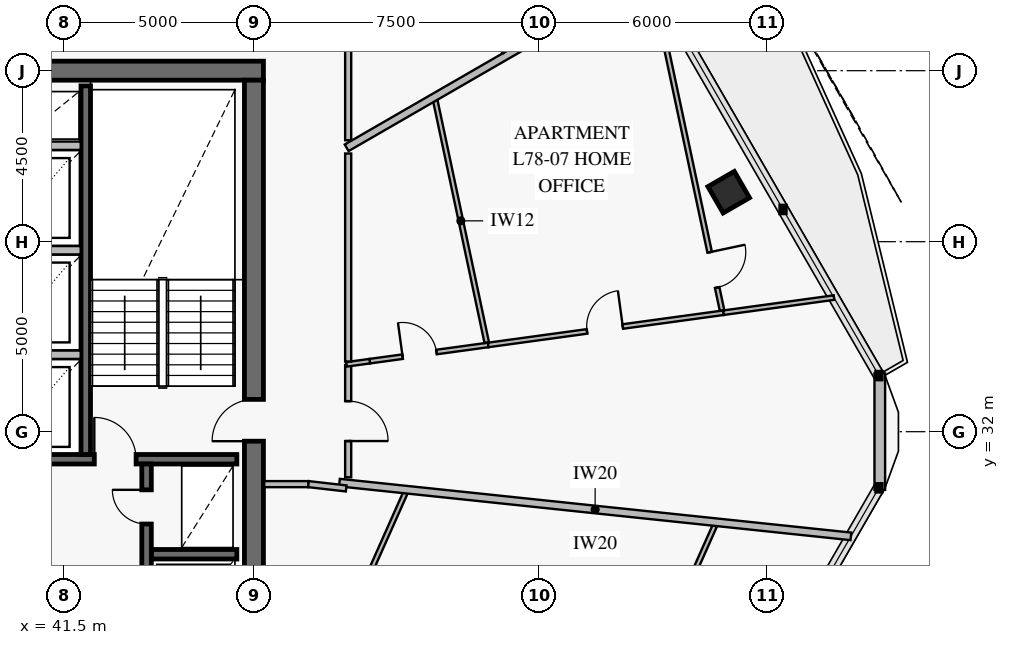
"""IFC4 building model, lengths in metres.
Left out: names, types, materials, properties, quantities, classifications, styles, units other than length and angle.
Written with IfcOpenShell. Run it as: python <this file> out.ifc"""

import sys

from ifc_helpers import new_model, si_unit, direction, frame, frame_2d, origin, origin_2d, place, context, subcontext, project, spatial, rectangle, extrude, element, fill, save


model = new_model("IFC4")
c1 = context("Model", 3, precision=1e-05, world=origin(), true_north=direction((0.0, 1.0)))
c2 = subcontext(c1, "Body", "Model", "MODEL_VIEW")
j1 = project(units=[si_unit("LENGTHUNIT", "METRE"), si_unit("PLANEANGLEUNIT", "RADIAN")], contexts=[c1])
p1 = place(None, origin())
s1 = spatial("IfcSite", under=j1, at=p1, CompositionType="ELEMENT")
p2 = place(p1, origin())
s2 = spatial("IfcBuilding", under=s1, at=p2, CompositionType="ELEMENT")
p3 = place(p2, frame((0.0, 0.0, 308.2)))
s3 = spatial("IfcBuildingStorey", under=s2, at=p3, CompositionType="ELEMENT", Elevation=308.2)
p4 = place(p3, frame((46.75, 41.5, 0.0), z_axis=(0.0, 0.0, 1.0), x_axis=(-1.0, 0.0, 0.0)))
e1 = element("IfcWall", 1, at=p4, inside=s3, PredefinedType="SHEAR", context=c2, shape_type="SweptSolid", body=[
    extrude(rectangle(XDim=7.8, YDim=0.5, at=frame_2d((3.9, 0.0))), origin(), (0.0, 0.0, 1.0), 3.8),
])
p5 = place(p3, frame((46.5, 22.75, 0.0), z_axis=(0.0, 0.0, 1.0), x_axis=(0.0, 1.0, 0.0)))
e2 = element("IfcWall", 2, at=p5, inside=s3, PredefinedType="SHEAR", context=c2, shape_type="SweptSolid", body=[
    extrude(rectangle(XDim=18.5, YDim=0.5, at=frame_2d((9.25, 0.0))), origin(), (0.0, 0.0, 1.0), 3.8),
])
p6 = place(p5, frame((9.0, 0.0, 0.0)))
e3 = element("IfcOpeningElement", 3, at=p6, cuts=e2, PredefinedType="OPENING", context=c2, shape_type="SweptSolid", body=[
    extrude(rectangle(XDim=1.1, YDim=2.15, at=frame_2d((0.55, 1.075))), frame((0.0, 0.262, 0.0), z_axis=(0.0, -1.0, 0.0), x_axis=(1.0, 0.0, 0.0)), (0.0, 0.0, 1.0), 0.524),
])
p7 = place(p3, frame((58.993, 38.302, 0.0), z_axis=(0.0, 0.0, 1.0), x_axis=(-0.5, 0.866025403784, 0.0)))
e4 = element("IfcColumn", 4, at=p7, inside=s3, PredefinedType="COLUMN", context=c2, shape_type="SweptSolid", body=[
    extrude(rectangle(XDim=0.8, YDim=0.8, at=origin_2d()), origin(), (0.0, 0.0, 1.0), 3.55),
])
p8 = place(p3, frame((62.969, 33.532, 0.0), z_axis=(0.0, 0.0, 1.0), x_axis=(0.0, -1.0, 0.0)))
e5 = element("IfcWall", 5, at=p8, inside=s3, PredefinedType="SOLIDWALL", context=c2, shape_type="SweptSolid", body=[
    extrude(rectangle(XDim=3.065, YDim=0.28, at=frame_2d((1.532, 0.0))), origin(), (0.0, 0.0, 1.0), 3.55),
])
p9 = place(p3, frame((25.95, 31.275, 0.0), z_axis=(0.0, 0.0, 1.0), x_axis=(1.0, 0.0, 0.0)))
e6 = element("IfcWall", 6, at=p9, inside=s3, PredefinedType="SOLIDWALL", context=c2, shape_type="SweptSolid", body=[
    extrude(rectangle(XDim=20.1, YDim=0.25, at=frame_2d((10.05, 0.0))), origin(), (0.0, 0.0, 1.0), 3.8),
])
p10 = place(p9, frame((2.6, 0.0, 0.0)))
e7 = element("IfcOpeningElement", 7, at=p10, cuts=e6, PredefinedType="OPENING", context=c2, shape_type="SweptSolid", body=[
    extrude(rectangle(XDim=1.1, YDim=2.15, at=frame_2d((0.55, 1.075))), frame((0.0, 0.137, 0.0), z_axis=(0.0, -1.0, 0.0), x_axis=(1.0, 0.0, 0.0)), (0.0, 0.0, 1.0), 0.274),
])
p11 = place(p9, frame((10.6, 0.0, 0.0)))
e8 = element("IfcOpeningElement", 8, at=p11, cuts=e6, PredefinedType="OPENING", context=c2, shape_type="SweptSolid", body=[
    extrude(rectangle(XDim=1.1, YDim=2.15, at=frame_2d((0.55, 1.075))), frame((0.0, 0.137, 0.0), z_axis=(0.0, -1.0, 0.0), x_axis=(1.0, 0.0, 0.0)), (0.0, 0.0, 1.0), 0.274),
])
p12 = place(p9, frame((16.35, 0.0, 0.0)))
e9 = element("IfcOpeningElement", 9, at=p12, cuts=e6, PredefinedType="OPENING", context=c2, shape_type="SweptSolid", body=[
    extrude(rectangle(XDim=1.1, YDim=2.15, at=frame_2d((0.55, 1.075))), frame((0.0, 0.137, 0.0), z_axis=(0.0, -1.0, 0.0), x_axis=(1.0, 0.0, 0.0)), (0.0, 0.0, 1.0), 0.274),
])
p13 = place(p3, frame((42.075, 31.4, 0.0), z_axis=(0.0, 0.0, 1.0), x_axis=(0.0, 1.0, 0.0)))
e10 = element("IfcWall", 10, at=p13, inside=s3, PredefinedType="SOLIDWALL", context=c2, shape_type="SweptSolid", body=[
    extrude(rectangle(XDim=9.7, YDim=0.25, at=frame_2d((4.85, 0.0))), origin(), (0.0, 0.0, 1.0), 3.8),
])
p14 = place(p3, frame((43.8, 28.775, 0.0), z_axis=(0.0, 0.0, 1.0), x_axis=(1.0, 0.0, 0.0)))
e11 = element("IfcWall", 11, at=p14, inside=s3, PredefinedType="SOLIDWALL", context=c2, shape_type="SweptSolid", body=[
    extrude(rectangle(XDim=2.25, YDim=0.25, at=frame_2d((1.125, 0.0))), origin(), (0.0, 0.0, 1.0), 3.8),
])
p15 = place(p3, frame((43.675, 22.95, 0.0), z_axis=(0.0, 0.0, 1.0), x_axis=(0.0, 1.0, 0.0)))
e12 = element("IfcWall", 12, at=p15, inside=s3, PredefinedType="SOLIDWALL", context=c2, shape_type="SweptSolid", body=[
    extrude(rectangle(XDim=8.2, YDim=0.25, at=frame_2d((4.1, 0.0))), origin(), (0.0, 0.0, 1.0), 3.8),
])
p16 = place(p15, frame((0.75, 0.0, 0.0)))
e13 = element("IfcOpeningElement", 13, at=p16, cuts=e12, PredefinedType="OPENING", context=c2, shape_type="SweptSolid", body=[
    extrude(rectangle(XDim=1.3, YDim=2.3, at=frame_2d((0.65, 1.15))), frame((0.0, 0.137, 0.0), z_axis=(0.0, -1.0, 0.0), x_axis=(1.0, 0.0, 0.0)), (0.0, 0.0, 1.0), 0.274),
])
p17 = place(p15, frame((3.7, 0.0, 0.0)))
e14 = element("IfcOpeningElement", 14, at=p17, cuts=e12, PredefinedType="OPENING", context=c2, shape_type="SweptSolid", body=[
    extrude(rectangle(XDim=1.3, YDim=2.3, at=frame_2d((0.65, 1.15))), frame((0.0, 0.137, 0.0), z_axis=(0.0, -1.0, 0.0), x_axis=(1.0, 0.0, 0.0)), (0.0, 0.0, 1.0), 0.274),
])
p18 = place(p15, frame((6.62, 0.0, 0.0)))
e15 = element("IfcOpeningElement", 15, at=p18, cuts=e12, PredefinedType="OPENING", context=c2, shape_type="SweptSolid", body=[
    extrude(rectangle(XDim=0.9, YDim=2.1, at=frame_2d((0.45, 1.05))), frame((0.0, 0.137, 0.0), z_axis=(0.0, -1.0, 0.0), x_axis=(1.0, 0.0, 0.0)), (0.0, 0.0, 1.0), 0.274),
])
p19 = place(p3, frame((55.183, 21.791, 0.0), z_axis=(0.0, 0.0, 1.0), x_axis=(0.406737913361, 0.913544892074, 0.0)))
e16 = element("IfcWall", 16, at=p19, inside=s3, PredefinedType="PARTITIONING", context=c2, shape_type="SweptSolid", body=[
    extrude(rectangle(XDim=8.463, YDim=0.12, at=frame_2d((4.232, 0.0))), origin(), (0.0, 0.0, 1.0), 3.0),
])
p20 = place(p19, frame((3.672, 0.0, 0.0)))
e17 = element("IfcOpeningElement", 17, at=p20, cuts=e16, PredefinedType="OPENING", context=c2, shape_type="SweptSolid", body=[
    extrude(rectangle(XDim=0.95, YDim=2.1, at=frame_2d((0.475, 1.05))), frame((0.0, 0.072, 0.0), z_axis=(0.0, -1.0, 0.0), x_axis=(1.0, 0.0, 0.0)), (0.0, 0.0, 1.0), 0.144),
])
p21 = place(p3, frame((49.55, 33.856, 0.0), z_axis=(0.0, 0.0, 1.0), x_axis=(0.990754403165, 0.135667654987, 0.0)))
e18 = element("IfcWall", 18, at=p21, inside=s3, PredefinedType="PARTITIONING", context=c2, shape_type="SweptSolid", body=[
    extrude(rectangle(XDim=3.144, YDim=0.12, at=frame_2d((1.572, 0.0))), origin(), (0.0, 0.0, 1.0), 3.55),
])
p22 = place(p21, frame((0.87, 0.0, 0.0)))
e19 = element("IfcOpeningElement", 19, at=p22, cuts=e18, PredefinedType="OPENING", context=c2, shape_type="SweptSolid", body=[
    extrude(rectangle(XDim=0.9, YDim=2.1, at=frame_2d((0.45, 1.05))), frame((0.0, 0.072, 0.0), z_axis=(0.0, -1.0, 0.0), x_axis=(1.0, 0.0, 0.0)), (0.0, 0.0, 1.0), 0.144),
])
p23 = place(p3, frame((52.665, 34.283, 0.0), z_axis=(0.0, 0.0, 1.0), x_axis=(0.990745092284, 0.135735633182, 0.0)))
e20 = element("IfcWall", 20, at=p23, inside=s3, PredefinedType="PARTITIONING", context=c2, shape_type="SweptSolid", body=[
    extrude(rectangle(XDim=6.249, YDim=0.12, at=frame_2d((3.124, 0.0))), origin(), (0.0, 0.0, 1.0), 3.55),
])
p24 = place(p23, frame((2.624, 0.0, 0.0)))
e21 = element("IfcOpeningElement", 21, at=p24, cuts=e20, PredefinedType="OPENING", context=c2, shape_type="SweptSolid", body=[
    extrude(rectangle(XDim=0.95, YDim=2.1, at=frame_2d((0.475, 1.05))), frame((0.0, 0.072, 0.0), z_axis=(0.0, -1.0, 0.0), x_axis=(1.0, 0.0, 0.0)), (0.0, 0.0, 1.0), 0.144),
])
p25 = place(p3, frame((58.817, 35.194, 0.0), z_axis=(0.0, 0.0, 1.0), x_axis=(-0.20790706988, 0.978148582933, 0.0)))
e22 = element("IfcWall", 22, at=p25, inside=s3, PredefinedType="PARTITIONING", context=c2, shape_type="SweptSolid", body=[
    extrude(rectangle(XDim=8.945, YDim=0.12, at=frame_2d((4.472, 0.0))), origin(), (0.0, 0.0, 1.0), 2.97),
])
p26 = place(p25, frame((0.613, 0.0, 0.0)))
e23 = element("IfcOpeningElement", 23, at=p26, cuts=e22, PredefinedType="OPENING", context=c2, shape_type="SweptSolid", body=[
    extrude(rectangle(XDim=0.95, YDim=2.1, at=frame_2d((0.475, 1.05))), frame((0.0, 0.072, 0.0), z_axis=(0.0, -1.0, 0.0), x_axis=(1.0, 0.0, 0.0)), (0.0, 0.0, 1.0), 0.144),
])
p27 = place(p3, frame((48.98, 30.8, 0.0), z_axis=(0.0, 0.0, 1.0), x_axis=(0.0, 1.0, 0.0)))
e24 = element("IfcWall", 24, at=p27, inside=s3, PredefinedType="PARTITIONING", context=c2, shape_type="SweptSolid", body=[
    extrude(rectangle(XDim=2.958, YDim=0.16, at=frame_2d((1.479, 0.0))), origin(), (0.0, 0.0, 1.0), 3.55),
])
p28 = place(p27, frame((0.954, 0.0, 0.0)))
e25 = element("IfcOpeningElement", 25, at=p28, cuts=e24, PredefinedType="OPENING", context=c2, shape_type="SweptSolid", body=[
    extrude(rectangle(XDim=1.05, YDim=2.15, at=frame_2d((0.525, 1.075))), frame((0.0, 0.092, 0.0), z_axis=(0.0, -1.0, 0.0), x_axis=(1.0, 0.0, 0.0)), (0.0, 0.0, 1.0), 0.184),
])
for number, where, z_axis, x_axis in (
    (26, (39.558, 34.025, 0.0), (0.0, 0.0, 1.0), (1.0, 0.0, 0.0)),
    (27, (39.558, 36.775, 0.0), (0.0, 0.0, 1.0), (1.0, 0.0, 0.0)),
    (28, (39.558, 39.525, 0.0), (0.0, 0.0, 1.0), (1.0, 0.0, 0.0)),
):
    element("IfcWall", number, at=place(p3, frame(where, z_axis=z_axis, x_axis=x_axis)), inside=s3, PredefinedType="PARTITIONING", context=c2, shape_type="SweptSolid", body=[
        extrude(rectangle(XDim=2.384, YDim=0.22, at=frame_2d((1.192, 0.0))), origin(), (0.0, 0.0, 1.0), 3.55),
    ])
p29 = place(p3, frame((48.3, 25.482, 0.0), z_axis=(0.0, 0.0, 1.0), x_axis=(0.406734356289, 0.913546475782, 0.0)))
e29 = element("IfcWall", 29, at=p29, inside=s3, PredefinedType="PARTITIONING", context=c2, shape_type="SweptSolid", body=[
    extrude(rectangle(XDim=5.435, YDim=0.12, at=frame_2d((2.718, 0.0))), origin(), (0.0, 0.0, 1.0), 3.0),
])
p30 = place(p3, frame((48.749, 30.66, 0.0), z_axis=(0.0, 0.0, 1.0), x_axis=(0.994522047609, -0.104527014781, 0.0)))
e30 = element("IfcWall", 30, at=p30, inside=s3, PredefinedType="PARTITIONING", context=c2, shape_type="SweptSolid", body=[
    extrude(rectangle(XDim=13.533, YDim=0.2, at=frame_2d((6.767, 0.0))), origin(), (0.0, 0.0, 1.0), 2.97),
])
p31 = place(p3, frame((48.935, 33.772, 0.0), z_axis=(0.0, 0.0, 1.0), x_axis=(0.990743771345, 0.135745274469, 0.0)))
e31 = element("IfcWall", 31, at=p31, inside=s3, PredefinedType="PARTITIONING", context=c2, shape_type="SweptSolid", body=[
    extrude(rectangle(XDim=0.621, YDim=0.12, at=frame_2d((0.31, 0.0))), origin(), (0.0, 0.0, 1.0), 3.55),
])
p32 = place(p3, frame((58.855, 35.131, 0.0), z_axis=(0.0, 0.0, 1.0), x_axis=(0.990749539567, 0.135703168156, 0.0)))
e32 = element("IfcWall", 32, at=p32, inside=s3, PredefinedType="PARTITIONING", context=c2, shape_type="SweptSolid", body=[
    extrude(rectangle(XDim=2.936, YDim=0.12, at=frame_2d((1.468, 0.0))), origin(), (0.0, 0.0, 1.0), 2.97),
])
p33 = place(p3, frame((52.626, 34.346, 0.0), z_axis=(0.0, 0.0, 1.0), x_axis=(-0.207896658566, 0.978150795817, 0.0)))
e33 = element("IfcWall", 33, at=p33, inside=s3, PredefinedType="PARTITIONING", context=c2, shape_type="SweptSolid", body=[
    extrude(rectangle(XDim=6.548, YDim=0.12, at=frame_2d((3.274, 0.0))), origin(), (0.0, 0.0, 1.0), 3.0),
])
p34 = place(p3, frame((48.94, 39.471, 0.0), z_axis=(0.0, 0.0, 1.0), x_axis=(0.866028436312, 0.499994747472, 0.0)))
e34 = element("IfcWall", 34, at=p34, inside=s3, PredefinedType="PARTITIONING", context=c2, shape_type="SweptSolid", body=[
    extrude(rectangle(XDim=9.132, YDim=0.2, at=frame_2d((4.566, 0.0))), origin(), (0.0, 0.0, 1.0), 2.97),
])
p35 = place(p3, frame((53.108, 42.002, 0.0), z_axis=(0.0, 0.0, 1.0), x_axis=(-0.731321501002, 0.682032889362, 0.0)))
e35 = element("IfcWall", 35, at=p35, inside=s3, PredefinedType="PARTITIONING", context=c2, shape_type="SweptSolid", body=[
    extrude(rectangle(XDim=3.537, YDim=0.12, at=frame_2d((1.768, 0.0))), origin(), (0.0, 0.0, 1.0), 3.55),
])
p36 = place(p3, frame((46.77, 30.62, 0.0), z_axis=(0.0, 0.0, 1.0), x_axis=(1.0, 0.0, 0.0)))
e36 = element("IfcWall", 36, at=p36, inside=s3, PredefinedType="PARTITIONING", context=c2, shape_type="SweptSolid", body=[
    extrude(rectangle(XDim=1.165, YDim=0.16, at=frame_2d((0.583, 0.0))), origin(), (0.0, 0.0, 1.0), 3.55),
])
p37 = place(p3, frame((47.935, 30.62, 0.0), z_axis=(0.0, 0.0, 1.0), x_axis=(0.99355156153, -0.113381191478, 0.0)))
e37 = element("IfcWall", 37, at=p37, inside=s3, PredefinedType="PARTITIONING", context=c2, shape_type="SweptSolid", body=[
    extrude(rectangle(XDim=0.999, YDim=0.16, at=frame_2d((0.5, 0.0))), origin(), (0.0, 0.0, 1.0), 3.55),
])
p38 = place(p3, frame((48.98, 33.847, 0.0), z_axis=(0.0, 0.0, 1.0), x_axis=(0.0, 1.0, 0.0)))
e38 = element("IfcWall", 38, at=p38, inside=s3, PredefinedType="PARTITIONING", context=c2, shape_type="SweptSolid", body=[
    extrude(rectangle(XDim=5.474, YDim=0.16, at=frame_2d((2.737, 0.0))), origin(), (0.0, 0.0, 1.0), 3.0),
])
p39 = place(p3, frame((48.98, 39.669, 0.0), z_axis=(0.0, 0.0, 1.0), x_axis=(0.0, 1.0, 0.0)))
e39 = element("IfcWall", 39, at=p39, inside=s3, PredefinedType="PARTITIONING", context=c2, shape_type="SweptSolid", body=[
    extrude(rectangle(XDim=3.418, YDim=0.16, at=frame_2d((1.709, 0.0))), origin(), (0.0, 0.0, 1.0), 3.55),
])
p40 = place(p6, origin())
e40 = element("IfcDoor", 40, at=p40, inside=s3, OperationType="SINGLE_SWING_LEFT", PredefinedType="USERDEFINED", context=c2, shape_type="SweptSolid", body=[
    extrude(rectangle(XDim=1.1, YDim=2.15, at=frame_2d((0.55, 1.075))), frame((0.0, 0.025, 0.0), z_axis=(0.0, -1.0, 0.0), x_axis=(1.0, 0.0, 0.0)), (0.0, 0.0, 1.0), 0.05),
])
fill(e3, e40)
p41 = place(p12, origin())
e41 = element("IfcDoor", 41, at=p41, inside=s3, OperationType="SINGLE_SWING_LEFT", PredefinedType="USERDEFINED", context=c2, shape_type="SweptSolid", body=[
    extrude(rectangle(XDim=1.1, YDim=2.15, at=frame_2d((0.55, 1.075))), frame((0.0, 0.025, 0.0), z_axis=(0.0, -1.0, 0.0), x_axis=(1.0, 0.0, 0.0)), (0.0, 0.0, 1.0), 0.05),
])
fill(e9, e41)
p42 = place(p18, origin())
e42 = element("IfcDoor", 42, at=p42, inside=s3, OperationType="SINGLE_SWING_RIGHT", PredefinedType="DOOR", context=c2, shape_type="SweptSolid", body=[
    extrude(rectangle(XDim=0.9, YDim=2.1, at=frame_2d((0.45, 1.05))), frame((0.0, 0.025, 0.0), z_axis=(0.0, -1.0, 0.0), x_axis=(1.0, 0.0, 0.0)), (0.0, 0.0, 1.0), 0.05),
])
fill(e15, e42)
p43 = place(p22, origin())
e43 = element("IfcDoor", 43, at=p43, inside=s3, OperationType="SINGLE_SWING_LEFT", PredefinedType="DOOR", context=c2, shape_type="SweptSolid", body=[
    extrude(rectangle(XDim=0.9, YDim=2.1, at=frame_2d((0.45, 1.05))), frame((0.0, 0.025, 0.0), z_axis=(0.0, -1.0, 0.0), x_axis=(1.0, 0.0, 0.0)), (0.0, 0.0, 1.0), 0.05),
])
fill(e19, e43)
p44 = place(p24, origin())
e44 = element("IfcDoor", 44, at=p44, inside=s3, OperationType="SINGLE_SWING_RIGHT", PredefinedType="DOOR", context=c2, shape_type="SweptSolid", body=[
    extrude(rectangle(XDim=0.95, YDim=2.1, at=frame_2d((0.475, 1.05))), frame((0.0, 0.025, 0.0), z_axis=(0.0, -1.0, 0.0), x_axis=(1.0, 0.0, 0.0)), (0.0, 0.0, 1.0), 0.05),
])
fill(e21, e44)
p45 = place(p26, frame((0.95, 0.0, 0.0), z_axis=(0.0, 0.0, 1.0), x_axis=(-1.0, 0.0, 0.0)))
e45 = element("IfcDoor", 45, at=p45, inside=s3, OperationType="SINGLE_SWING_LEFT", PredefinedType="DOOR", context=c2, shape_type="SweptSolid", body=[
    extrude(rectangle(XDim=0.95, YDim=2.1, at=frame_2d((0.475, 1.05))), frame((0.0, 0.025, 0.0), z_axis=(0.0, -1.0, 0.0), x_axis=(1.0, 0.0, 0.0)), (0.0, 0.0, 1.0), 0.05),
])
fill(e23, e45)
p46 = place(p28, frame((1.05, 0.0, 0.0), z_axis=(0.0, 0.0, 1.0), x_axis=(-1.0, 0.0, 0.0)))
e46 = element("IfcDoor", 46, at=p46, inside=s3, OperationType="SINGLE_SWING_RIGHT", PredefinedType="DOOR", context=c2, shape_type="SweptSolid", body=[
    extrude(rectangle(XDim=1.05, YDim=2.15, at=frame_2d((0.525, 1.075))), frame((0.0, 0.025, 0.0), z_axis=(0.0, -1.0, 0.0), x_axis=(1.0, 0.0, 0.0)), (0.0, 0.0, 1.0), 0.05),
])
fill(e25, e46)
save(model, sys.argv[1])
